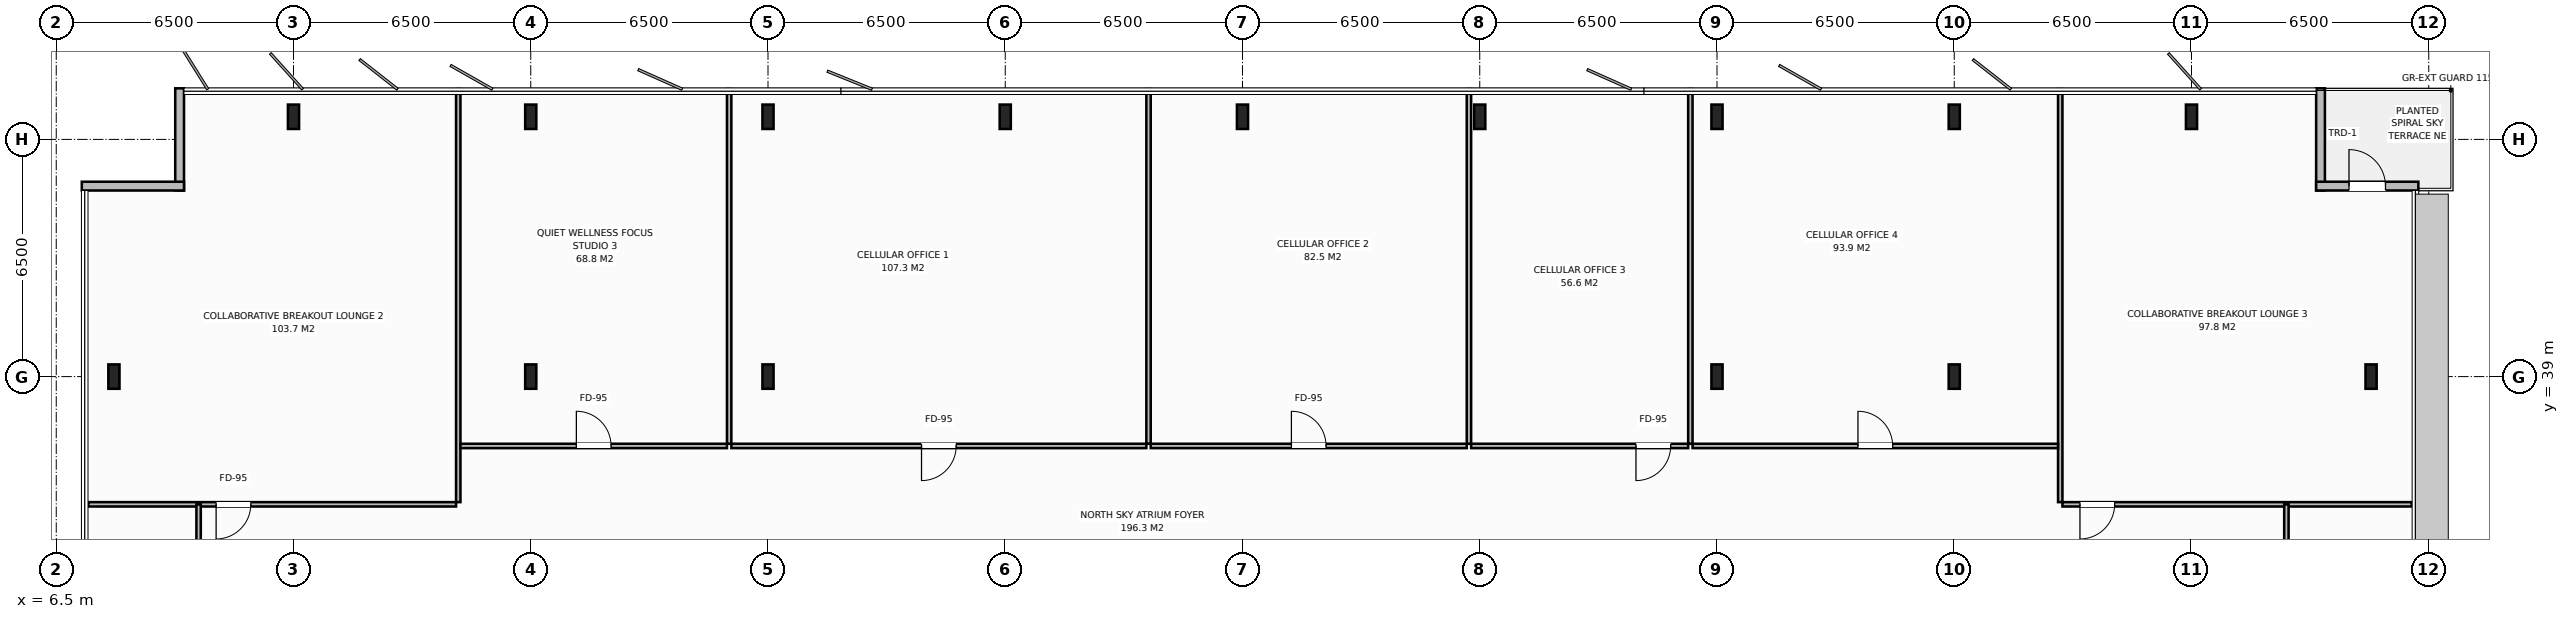
"""IFC4 building model, lengths in metres.
Left out: names, types, materials, properties, quantities, classifications, styles, units other than length and angle.
Written with IfcOpenShell. Run it as: python <this file> out.ifc"""

import sys

from ifc_helpers import new_model, si_unit, direction, frame, frame_2d, origin, origin_2d, place, context, subcontext, project, spatial, rectangle, i_section, extrude, element, fill, save


model = new_model("IFC4")
c1 = context("Model", 3, precision=1e-05, world=origin(), true_north=direction((0.0, 1.0)))
c2 = subcontext(c1, "Body", "Model", "MODEL_VIEW")
j1 = project(units=[si_unit("LENGTHUNIT", "METRE"), si_unit("PLANEANGLEUNIT", "RADIAN")], contexts=[c1])
p1 = place(None, origin())
s1 = spatial("IfcSite", under=j1, at=p1, CompositionType="ELEMENT")
p2 = place(p1, origin())
s2 = spatial("IfcBuilding", under=s1, at=p2, CompositionType="ELEMENT")
p3 = place(p2, frame((0.0, 0.0, 267.0)))
s3 = spatial("IfcBuildingStorey", under=s2, at=p3, CompositionType="ELEMENT", Elevation=267.0)
for number, where, z_axis, x_axis in (
    (1, (19.5, 39.0, 0.0), (0.0, 0.0, 1.0), (1.0, 0.0, 0.0)),
    (2, (58.5, 39.0, 0.0), (0.0, 0.0, 1.0), (1.0, 0.0, 0.0)),
    (3, (26.0, 39.0, 0.0), (0.0, 0.0, 1.0), (1.0, 0.0, 0.0)),
    (4, (52.0, 39.0, 0.0), (0.0, 0.0, 1.0), (1.0, 0.0, 0.0)),
    (5, (13.0, 46.12, 0.0), (0.0, 0.0, 1.0), (1.0, 0.0, 0.0)),
    (6, (19.5, 46.12, 0.0), (0.0, 0.0, 1.0), (1.0, 0.0, 0.0)),
    (7, (26.0, 46.12, 0.0), (0.0, 0.0, 1.0), (1.0, 0.0, 0.0)),
    (8, (32.5, 46.12, 0.0), (0.0, 0.0, 1.0), (1.0, 0.0, 0.0)),
    (9, (39.0, 46.12, 0.0), (0.0, 0.0, 1.0), (1.0, 0.0, 0.0)),
    (10, (45.5, 46.12, 0.0), (0.0, 0.0, 1.0), (1.0, 0.0, 0.0)),
    (11, (52.0, 46.12, 0.0), (0.0, 0.0, 1.0), (1.0, 0.0, 0.0)),
    (12, (58.5, 46.12, 0.0), (0.0, 0.0, 1.0), (1.0, 0.0, 0.0)),
    (13, (65.0, 46.12, 0.0), (0.0, 0.0, 1.0), (1.0, 0.0, 0.0)),
    (14, (8.08, 39.0, 0.0), (0.0, 0.0, 1.0), (1.0, 0.0, 0.0)),
    (15, (69.92, 39.0, 0.0), (0.0, 0.0, 1.0), (1.0, 0.0, 0.0)),
):
    element("IfcColumn", number, at=place(p3, frame(where, z_axis=z_axis, x_axis=x_axis)), inside=s3, PredefinedType="COLUMN", context=c2, shape_type="SweptSolid", body=[
        extrude(i_section(OverallWidth=0.305, OverallDepth=0.668, WebThickness=0.021, FlangeThickness=0.04, at=origin_2d()), origin(), (0.0, 0.0, 1.0), 3.8),
    ])
p4 = place(p3, frame((9.88, 44.1, 0.0), z_axis=(0.0, 0.0, 1.0), x_axis=(0.0, 1.0, 0.0)))
e16 = element("IfcWall", 16, at=p4, inside=s3, PredefinedType="STANDARD", context=c2, shape_type="SweptSolid", body=[
    extrude(rectangle(XDim=2.8, YDim=0.24, at=frame_2d((1.4, 0.0))), origin(), (0.0, 0.0, 1.0), 3.588),
])
p5 = place(p3, frame((7.2, 44.22, 0.0), z_axis=(0.0, 0.0, 1.0), x_axis=(1.0, 0.0, 0.0)))
e17 = element("IfcWall", 17, at=p5, inside=s3, PredefinedType="STANDARD", context=c2, shape_type="SweptSolid", body=[
    extrude(rectangle(XDim=2.8, YDim=0.24, at=frame_2d((1.4, 0.0))), origin(), (0.0, 0.0, 1.0), 3.588),
])
p6 = place(p3, frame((68.535, 46.9, 0.0), z_axis=(0.0, 0.0, 1.0), x_axis=(0.0, -1.0, 0.0)))
e18 = element("IfcWall", 18, at=p6, inside=s3, PredefinedType="STANDARD", context=c2, shape_type="SweptSolid", body=[
    extrude(rectangle(XDim=2.8, YDim=0.24, at=frame_2d((1.4, 0.0))), origin(), (0.0, 0.0, 1.0), 3.588),
])
p7 = place(p3, frame((68.415, 44.22, 0.0), z_axis=(0.0, 0.0, 1.0), x_axis=(1.0, 0.0, 0.0)))
e19 = element("IfcWall", 19, at=p7, inside=s3, PredefinedType="STANDARD", context=c2, shape_type="SweptSolid", body=[
    extrude(rectangle(XDim=2.8, YDim=0.24, at=frame_2d((1.4, 0.0))), origin(), (0.0, 0.0, 1.0), 3.588),
])
p8 = place(p7, frame((0.9, 0.0, 0.0)))
e20 = element("IfcOpeningElement", 20, at=p8, cuts=e19, PredefinedType="OPENING", context=c2, shape_type="SweptSolid", body=[
    extrude(rectangle(XDim=1.0, YDim=2.2, at=frame_2d((0.5, 1.1))), frame((0.0, 0.13, 0.0), z_axis=(0.0, -1.0, 0.0), x_axis=(1.0, 0.0, 0.0)), (0.0, 0.0, 1.0), 0.26),
])
p9 = place(p3, frame((17.514, 35.56, 0.0), z_axis=(0.0, 0.0, 1.0), x_axis=(0.0, 1.0, 0.0)))
e21 = element("IfcWall", 21, at=p9, inside=s3, PredefinedType="PARTITIONING", context=c2, shape_type="SweptSolid", body=[
    extrude(rectangle(XDim=11.32, YDim=0.12, at=frame_2d((5.66, 0.0))), origin(), (0.0, 0.0, 1.0), 3.588),
])
p10 = place(p3, frame((7.38, 35.5, 0.0), z_axis=(0.0, 0.0, 1.0), x_axis=(1.0, 0.0, 0.0)))
e22 = element("IfcWall", 22, at=p10, inside=s3, PredefinedType="PARTITIONING", context=c2, shape_type="SweptSolid", body=[
    extrude(rectangle(XDim=10.074, YDim=0.12, at=frame_2d((5.037, 0.0))), origin(), (0.0, 0.0, 1.0), 3.588),
])
p11 = place(p10, frame((3.5, 0.0, 0.0)))
e23 = element("IfcOpeningElement", 23, at=p11, cuts=e22, PredefinedType="OPENING", context=c2, shape_type="SweptSolid", body=[
    extrude(rectangle(XDim=0.95, YDim=2.15, at=frame_2d((0.475, 1.075))), frame((0.0, 0.07, 0.0), z_axis=(0.0, -1.0, 0.0), x_axis=(1.0, 0.0, 0.0)), (0.0, 0.0, 1.0), 0.14),
])
p12 = place(p3, frame((24.936, 37.16, 0.0), z_axis=(0.0, 0.0, 1.0), x_axis=(0.0, 1.0, 0.0)))
e24 = element("IfcWall", 24, at=p12, inside=s3, PredefinedType="PARTITIONING", context=c2, shape_type="SweptSolid", body=[
    extrude(rectangle(XDim=9.72, YDim=0.12, at=frame_2d((4.86, 0.0))), origin(), (0.0, 0.0, 1.0), 3.588),
])
p13 = place(p3, frame((17.574, 37.1, 0.0), z_axis=(0.0, 0.0, 1.0), x_axis=(1.0, 0.0, 0.0)))
e25 = element("IfcWall", 25, at=p13, inside=s3, PredefinedType="PARTITIONING", context=c2, shape_type="SweptSolid", body=[
    extrude(rectangle(XDim=7.302, YDim=0.12, at=frame_2d((3.651, 0.0))), origin(), (0.0, 0.0, 1.0), 3.588),
])
p14 = place(p13, frame((3.176, 0.0, 0.0)))
e26 = element("IfcOpeningElement", 26, at=p14, cuts=e25, PredefinedType="OPENING", context=c2, shape_type="SweptSolid", body=[
    extrude(rectangle(XDim=0.95, YDim=2.15, at=frame_2d((0.475, 1.075))), frame((0.0, 0.07, 0.0), z_axis=(0.0, -1.0, 0.0), x_axis=(1.0, 0.0, 0.0)), (0.0, 0.0, 1.0), 0.14),
])
p15 = place(p3, frame((36.426, 37.16, 0.0), z_axis=(0.0, 0.0, 1.0), x_axis=(0.0, 1.0, 0.0)))
e27 = element("IfcWall", 27, at=p15, inside=s3, PredefinedType="PARTITIONING", context=c2, shape_type="SweptSolid", body=[
    extrude(rectangle(XDim=9.72, YDim=0.12, at=frame_2d((4.86, 0.0))), origin(), (0.0, 0.0, 1.0), 3.588),
])
p16 = place(p3, frame((24.996, 37.1, 0.0), z_axis=(0.0, 0.0, 1.0), x_axis=(1.0, 0.0, 0.0)))
e28 = element("IfcWall", 28, at=p16, inside=s3, PredefinedType="PARTITIONING", context=c2, shape_type="SweptSolid", body=[
    extrude(rectangle(XDim=11.37, YDim=0.12, at=frame_2d((5.685, 0.0))), origin(), (0.0, 0.0, 1.0), 3.588),
])
p17 = place(p16, frame((5.21, 0.0, 0.0)))
e29 = element("IfcOpeningElement", 29, at=p17, cuts=e28, PredefinedType="OPENING", context=c2, shape_type="SweptSolid", body=[
    extrude(rectangle(XDim=0.95, YDim=2.15, at=frame_2d((0.475, 1.075))), frame((0.0, 0.07, 0.0), z_axis=(0.0, -1.0, 0.0), x_axis=(1.0, 0.0, 0.0)), (0.0, 0.0, 1.0), 0.14),
])
p18 = place(p3, frame((45.204, 37.16, 0.0), z_axis=(0.0, 0.0, 1.0), x_axis=(0.0, 1.0, 0.0)))
e30 = element("IfcWall", 30, at=p18, inside=s3, PredefinedType="PARTITIONING", context=c2, shape_type="SweptSolid", body=[
    extrude(rectangle(XDim=9.72, YDim=0.12, at=frame_2d((4.86, 0.0))), origin(), (0.0, 0.0, 1.0), 3.588),
])
p19 = place(p3, frame((36.486, 37.1, 0.0), z_axis=(0.0, 0.0, 1.0), x_axis=(1.0, 0.0, 0.0)))
e31 = element("IfcWall", 31, at=p19, inside=s3, PredefinedType="PARTITIONING", context=c2, shape_type="SweptSolid", body=[
    extrude(rectangle(XDim=8.658, YDim=0.12, at=frame_2d((4.329, 0.0))), origin(), (0.0, 0.0, 1.0), 3.588),
])
p20 = place(p19, frame((3.854, 0.0, 0.0)))
e32 = element("IfcOpeningElement", 32, at=p20, cuts=e31, PredefinedType="OPENING", context=c2, shape_type="SweptSolid", body=[
    extrude(rectangle(XDim=0.95, YDim=2.15, at=frame_2d((0.475, 1.075))), frame((0.0, 0.07, 0.0), z_axis=(0.0, -1.0, 0.0), x_axis=(1.0, 0.0, 0.0)), (0.0, 0.0, 1.0), 0.14),
])
p21 = place(p3, frame((51.27, 37.16, 0.0), z_axis=(0.0, 0.0, 1.0), x_axis=(0.0, 1.0, 0.0)))
e33 = element("IfcWall", 33, at=p21, inside=s3, PredefinedType="PARTITIONING", context=c2, shape_type="SweptSolid", body=[
    extrude(rectangle(XDim=9.72, YDim=0.12, at=frame_2d((4.86, 0.0))), origin(), (0.0, 0.0, 1.0), 3.588),
])
p22 = place(p3, frame((45.264, 37.1, 0.0), z_axis=(0.0, 0.0, 1.0), x_axis=(1.0, 0.0, 0.0)))
e34 = element("IfcWall", 34, at=p22, inside=s3, PredefinedType="PARTITIONING", context=c2, shape_type="SweptSolid", body=[
    extrude(rectangle(XDim=5.946, YDim=0.12, at=frame_2d((2.973, 0.0))), origin(), (0.0, 0.0, 1.0), 3.588),
])
p23 = place(p22, frame((4.516, 0.0, 0.0)))
e35 = element("IfcOpeningElement", 35, at=p23, cuts=e34, PredefinedType="OPENING", context=c2, shape_type="SweptSolid", body=[
    extrude(rectangle(XDim=0.95, YDim=2.15, at=frame_2d((0.475, 1.075))), frame((0.0, 0.07, 0.0), z_axis=(0.0, -1.0, 0.0), x_axis=(1.0, 0.0, 0.0)), (0.0, 0.0, 1.0), 0.14),
])
p24 = place(p3, frame((61.404, 35.56, 0.0), z_axis=(0.0, 0.0, 1.0), x_axis=(0.0, 1.0, 0.0)))
e36 = element("IfcWall", 36, at=p24, inside=s3, PredefinedType="PARTITIONING", context=c2, shape_type="SweptSolid", body=[
    extrude(rectangle(XDim=11.32, YDim=0.12, at=frame_2d((5.66, 0.0))), origin(), (0.0, 0.0, 1.0), 3.588),
])
p25 = place(p3, frame((51.33, 37.1, 0.0), z_axis=(0.0, 0.0, 1.0), x_axis=(1.0, 0.0, 0.0)))
e37 = element("IfcWall", 37, at=p25, inside=s3, PredefinedType="PARTITIONING", context=c2, shape_type="SweptSolid", body=[
    extrude(rectangle(XDim=10.014, YDim=0.12, at=frame_2d((5.007, 0.0))), origin(), (0.0, 0.0, 1.0), 3.588),
])
p26 = place(p25, frame((4.532, 0.0, 0.0)))
e38 = element("IfcOpeningElement", 38, at=p26, cuts=e37, PredefinedType="OPENING", context=c2, shape_type="SweptSolid", body=[
    extrude(rectangle(XDim=0.95, YDim=2.15, at=frame_2d((0.475, 1.075))), frame((0.0, 0.07, 0.0), z_axis=(0.0, -1.0, 0.0), x_axis=(1.0, 0.0, 0.0)), (0.0, 0.0, 1.0), 0.14),
])
p27 = place(p3, frame((61.464, 35.5, 0.0), z_axis=(0.0, 0.0, 1.0), x_axis=(1.0, 0.0, 0.0)))
e39 = element("IfcWall", 39, at=p27, inside=s3, PredefinedType="PARTITIONING", context=c2, shape_type="SweptSolid", body=[
    extrude(rectangle(XDim=9.571, YDim=0.12, at=frame_2d((4.785, 0.0))), origin(), (0.0, 0.0, 1.0), 3.588),
])
p28 = place(p27, frame((0.48, 0.0, 0.0)))
e40 = element("IfcOpeningElement", 40, at=p28, cuts=e39, PredefinedType="OPENING", context=c2, shape_type="SweptSolid", body=[
    extrude(rectangle(XDim=0.95, YDim=2.15, at=frame_2d((0.475, 1.075))), frame((0.0, 0.07, 0.0), z_axis=(0.0, -1.0, 0.0), x_axis=(1.0, 0.0, 0.0)), (0.0, 0.0, 1.0), 0.14),
])
p29 = place(p3, frame((10.4, 16.5, 0.0), z_axis=(0.0, 0.0, 1.0), x_axis=(0.0, 1.0, 0.0)))
e41 = element("IfcWall", 41, at=p29, inside=s3, PredefinedType="PARTITIONING", context=c2, shape_type="SweptSolid", body=[
    extrude(rectangle(XDim=19.0, YDim=0.12, at=frame_2d((9.5, 0.0))), origin(), (0.0, 0.0, 1.0), 3.588),
])
p30 = place(p29, frame((9.025, 0.0, 0.0)))
e42 = element("IfcOpeningElement", 42, at=p30, cuts=e41, PredefinedType="OPENING", context=c2, shape_type="SweptSolid", body=[
    extrude(rectangle(XDim=0.95, YDim=2.15, at=frame_2d((0.475, 1.075))), frame((0.0, 0.07, 0.0), z_axis=(0.0, -1.0, 0.0), x_axis=(1.0, 0.0, 0.0)), (0.0, 0.0, 1.0), 0.14),
])
p31 = place(p3, frame((67.6, 27.05, 0.0), z_axis=(0.0, 0.0, 1.0), x_axis=(0.0, 1.0, 0.0)))
e43 = element("IfcWall", 43, at=p31, inside=s3, PredefinedType="PARTITIONING", context=c2, shape_type="SweptSolid", body=[
    extrude(rectangle(XDim=8.45, YDim=0.12, at=frame_2d((4.225, 0.0))), origin(), (0.0, 0.0, 1.0), 3.588),
])
p32 = place(p31, frame((2.7, 0.0, 0.0)))
e44 = element("IfcOpeningElement", 44, at=p32, cuts=e43, PredefinedType="OPENING", context=c2, shape_type="SweptSolid", body=[
    extrude(rectangle(XDim=0.95, YDim=2.15, at=frame_2d((0.475, 1.075))), frame((0.0, 0.07, 0.0), z_axis=(0.0, -1.0, 0.0), x_axis=(1.0, 0.0, 0.0)), (0.0, 0.0, 1.0), 0.14),
])
p33 = place(p8, origin())
e45 = element("IfcDoor", 45, at=p33, inside=s3, OperationType="SINGLE_SWING_LEFT", PredefinedType="DOOR", context=c2, shape_type="SweptSolid", body=[
    extrude(rectangle(XDim=1.0, YDim=2.2, at=frame_2d((0.5, 1.1))), frame((0.0, 0.025, 0.0), z_axis=(0.0, -1.0, 0.0), x_axis=(1.0, 0.0, 0.0)), (0.0, 0.0, 1.0), 0.05),
])
fill(e20, e45)
p34 = place(p11, origin())
e46 = element("IfcDoor", 46, at=p34, inside=s3, OperationType="SINGLE_SWING_RIGHT", PredefinedType="DOOR", context=c2, shape_type="SweptSolid", body=[
    extrude(rectangle(XDim=0.95, YDim=2.15, at=frame_2d((0.475, 1.075))), frame((0.0, 0.025, 0.0), z_axis=(0.0, -1.0, 0.0), x_axis=(1.0, 0.0, 0.0)), (0.0, 0.0, 1.0), 0.05),
])
fill(e23, e46)
p35 = place(p14, origin())
e47 = element("IfcDoor", 47, at=p35, inside=s3, OperationType="SINGLE_SWING_LEFT", PredefinedType="DOOR", context=c2, shape_type="SweptSolid", body=[
    extrude(rectangle(XDim=0.95, YDim=2.15, at=frame_2d((0.475, 1.075))), frame((0.0, 0.025, 0.0), z_axis=(0.0, -1.0, 0.0), x_axis=(1.0, 0.0, 0.0)), (0.0, 0.0, 1.0), 0.05),
])
fill(e26, e47)
p36 = place(p17, origin())
e48 = element("IfcDoor", 48, at=p36, inside=s3, OperationType="SINGLE_SWING_RIGHT", PredefinedType="DOOR", context=c2, shape_type="SweptSolid", body=[
    extrude(rectangle(XDim=0.95, YDim=2.15, at=frame_2d((0.475, 1.075))), frame((0.0, 0.025, 0.0), z_axis=(0.0, -1.0, 0.0), x_axis=(1.0, 0.0, 0.0)), (0.0, 0.0, 1.0), 0.05),
])
fill(e29, e48)
p37 = place(p20, origin())
e49 = element("IfcDoor", 49, at=p37, inside=s3, OperationType="SINGLE_SWING_LEFT", PredefinedType="DOOR", context=c2, shape_type="SweptSolid", body=[
    extrude(rectangle(XDim=0.95, YDim=2.15, at=frame_2d((0.475, 1.075))), frame((0.0, 0.025, 0.0), z_axis=(0.0, -1.0, 0.0), x_axis=(1.0, 0.0, 0.0)), (0.0, 0.0, 1.0), 0.05),
])
fill(e32, e49)
p38 = place(p23, origin())
e50 = element("IfcDoor", 50, at=p38, inside=s3, OperationType="SINGLE_SWING_RIGHT", PredefinedType="DOOR", context=c2, shape_type="SweptSolid", body=[
    extrude(rectangle(XDim=0.95, YDim=2.15, at=frame_2d((0.475, 1.075))), frame((0.0, 0.025, 0.0), z_axis=(0.0, -1.0, 0.0), x_axis=(1.0, 0.0, 0.0)), (0.0, 0.0, 1.0), 0.05),
])
fill(e35, e50)
p39 = place(p26, origin())
e51 = element("IfcDoor", 51, at=p39, inside=s3, OperationType="SINGLE_SWING_LEFT", PredefinedType="DOOR", context=c2, shape_type="SweptSolid", body=[
    extrude(rectangle(XDim=0.95, YDim=2.15, at=frame_2d((0.475, 1.075))), frame((0.0, 0.025, 0.0), z_axis=(0.0, -1.0, 0.0), x_axis=(1.0, 0.0, 0.0)), (0.0, 0.0, 1.0), 0.05),
])
fill(e38, e51)
p40 = place(p28, origin())
e52 = element("IfcDoor", 52, at=p40, inside=s3, OperationType="SINGLE_SWING_RIGHT", PredefinedType="DOOR", context=c2, shape_type="SweptSolid", body=[
    extrude(rectangle(XDim=0.95, YDim=2.15, at=frame_2d((0.475, 1.075))), frame((0.0, 0.025, 0.0), z_axis=(0.0, -1.0, 0.0), x_axis=(1.0, 0.0, 0.0)), (0.0, 0.0, 1.0), 0.05),
])
fill(e40, e52)
save(model, sys.argv[1])
